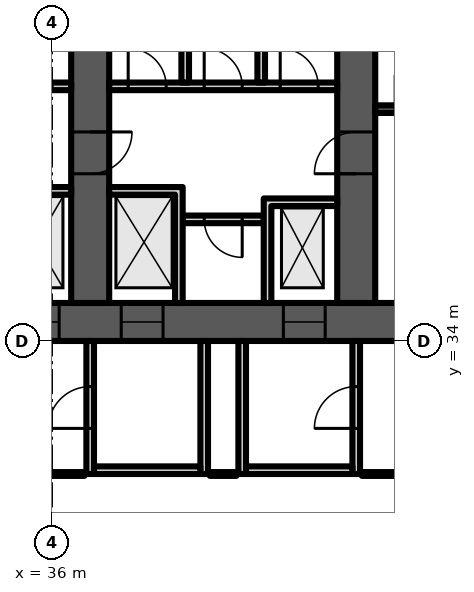
"""IFC4 building model, lengths in metres.
Left out: names, types, materials, properties, quantities, classifications, styles, units other than length and angle.
Written with IfcOpenShell. Run it as: python <this file> out.ifc"""

import sys

from ifc_helpers import new_model, si_unit, direction, frame, frame_2d, origin, place, context, subcontext, project, spatial, polyline, rectangle, outline, extrude, element, fill, save


model = new_model("IFC4")
c1 = context("Model", 3, precision=1e-05, world=origin(), true_north=direction((0.0, 1.0)))
c2 = subcontext(c1, "Body", "Model", "MODEL_VIEW")
j1 = project(units=[si_unit("LENGTHUNIT", "METRE"), si_unit("PLANEANGLEUNIT", "RADIAN")], contexts=[c1])
p1 = place(None, origin())
s1 = spatial("IfcSite", under=j1, at=p1, CompositionType="ELEMENT")
p2 = place(p1, origin())
s2 = spatial("IfcBuilding", under=s1, at=p2, CompositionType="ELEMENT")
p3 = place(p2, frame((0.0, 0.0, 96.7)))
s3 = spatial("IfcBuildingStorey", under=s2, at=p3, CompositionType="ELEMENT", Elevation=96.7)
p4 = place(p3, frame((16.0, 34.5, 0.0), z_axis=(0.0, 0.0, 1.0), x_axis=(1.0, 0.0, 0.0)))
e1 = element("IfcWall", 1, at=p4, inside=s3, PredefinedType="SHEAR", context=c2, shape_type="SweptSolid", body=[
    extrude(rectangle(XDim=49.0, YDim=1.0, at=frame_2d((24.5, 0.0))), origin(), (0.0, 0.0, 1.0), 3.6),
])
p5 = place(p4, frame((1.2, 0.0, 0.0)))
e2 = element("IfcOpeningElement", 2, at=p5, cuts=e1, PredefinedType="OPENING", context=c2, shape_type="SweptSolid", body=[
    extrude(rectangle(XDim=1.1, YDim=2.1, at=frame_2d((0.55, 1.05))), frame((0.0, 0.51, 0.0), z_axis=(0.0, -1.0, 0.0), x_axis=(1.0, 0.0, 0.0)), (0.0, 0.0, 1.0), 1.02),
])
p6 = place(p4, frame((5.083, 0.0, 0.0)))
e3 = element("IfcOpeningElement", 3, at=p6, cuts=e1, PredefinedType="OPENING", context=c2, shape_type="SweptSolid", body=[
    extrude(rectangle(XDim=1.1, YDim=2.1, at=frame_2d((0.55, 1.05))), frame((0.0, 0.51, 0.0), z_axis=(0.0, -1.0, 0.0), x_axis=(1.0, 0.0, 0.0)), (0.0, 0.0, 1.0), 1.02),
])
p7 = place(p4, frame((2.933, 0.0, 0.0)))
e4 = element("IfcOpeningElement", 4, at=p7, cuts=e1, PredefinedType="OPENING", context=c2, shape_type="SweptSolid", body=[
    extrude(rectangle(XDim=1.4, YDim=2.1, at=frame_2d((0.7, 1.05))), frame((0.0, 0.51, 0.0), z_axis=(0.0, -1.0, 0.0), x_axis=(1.0, 0.0, 0.0)), (0.0, 0.0, 1.0), 1.02),
])
p8 = place(p4, frame((7.65, 0.0, 0.0)))
e5 = element("IfcOpeningElement", 5, at=p8, cuts=e1, PredefinedType="OPENING", context=c2, shape_type="SweptSolid", body=[
    extrude(rectangle(XDim=1.2, YDim=2.1, at=frame_2d((0.6, 1.05))), frame((0.0, 0.51, 0.0), z_axis=(0.0, -1.0, 0.0), x_axis=(1.0, 0.0, 0.0)), (0.0, 0.0, 1.0), 1.02),
])
p9 = place(p4, frame((14.817, 0.0, 0.0)))
e6 = element("IfcOpeningElement", 6, at=p9, cuts=e1, PredefinedType="OPENING", context=c2, shape_type="SweptSolid", body=[
    extrude(rectangle(XDim=1.1, YDim=2.1, at=frame_2d((0.55, 1.05))), frame((0.0, 0.51, 0.0), z_axis=(0.0, -1.0, 0.0), x_axis=(1.0, 0.0, 0.0)), (0.0, 0.0, 1.0), 1.02),
])
p10 = place(p4, frame((19.083, 0.0, 0.0)))
e7 = element("IfcOpeningElement", 7, at=p10, cuts=e1, PredefinedType="OPENING", context=c2, shape_type="SweptSolid", body=[
    extrude(rectangle(XDim=1.1, YDim=2.1, at=frame_2d((0.55, 1.05))), frame((0.0, 0.51, 0.0), z_axis=(0.0, -1.0, 0.0), x_axis=(1.0, 0.0, 0.0)), (0.0, 0.0, 1.0), 1.02),
])
p11 = place(p4, frame((16.8, 0.0, 0.0)))
e8 = element("IfcOpeningElement", 8, at=p11, cuts=e1, PredefinedType="OPENING", context=c2, shape_type="SweptSolid", body=[
    extrude(rectangle(XDim=1.4, YDim=2.1, at=frame_2d((0.7, 1.05))), frame((0.0, 0.51, 0.0), z_axis=(0.0, -1.0, 0.0), x_axis=(1.0, 0.0, 0.0)), (0.0, 0.0, 1.0), 1.02),
])
p12 = place(p4, frame((21.817, 0.0, 0.0)))
e9 = element("IfcOpeningElement", 9, at=p12, cuts=e1, PredefinedType="OPENING", context=c2, shape_type="SweptSolid", body=[
    extrude(rectangle(XDim=1.1, YDim=2.1, at=frame_2d((0.55, 1.05))), frame((0.0, 0.51, 0.0), z_axis=(0.0, -1.0, 0.0), x_axis=(1.0, 0.0, 0.0)), (0.0, 0.0, 1.0), 1.02),
])
p13 = place(p4, frame((26.083, 0.0, 0.0)))
e10 = element("IfcOpeningElement", 10, at=p13, cuts=e1, PredefinedType="OPENING", context=c2, shape_type="SweptSolid", body=[
    extrude(rectangle(XDim=1.1, YDim=2.1, at=frame_2d((0.55, 1.05))), frame((0.0, 0.51, 0.0), z_axis=(0.0, -1.0, 0.0), x_axis=(1.0, 0.0, 0.0)), (0.0, 0.0, 1.0), 1.02),
])
p14 = place(p4, frame((33.15, 0.0, 0.0)))
e11 = element("IfcOpeningElement", 11, at=p14, cuts=e1, PredefinedType="OPENING", context=c2, shape_type="SweptSolid", body=[
    extrude(rectangle(XDim=1.2, YDim=2.1, at=frame_2d((0.6, 1.05))), frame((0.0, 0.51, 0.0), z_axis=(0.0, -1.0, 0.0), x_axis=(1.0, 0.0, 0.0)), (0.0, 0.0, 1.0), 1.02),
])
p15 = place(p4, frame((37.8, 0.0, 0.0)))
e12 = element("IfcOpeningElement", 12, at=p15, cuts=e1, PredefinedType="OPENING", context=c2, shape_type="SweptSolid", body=[
    extrude(rectangle(XDim=1.4, YDim=2.1, at=frame_2d((0.7, 1.05))), frame((0.0, 0.51, 0.0), z_axis=(0.0, -1.0, 0.0), x_axis=(1.0, 0.0, 0.0)), (0.0, 0.0, 1.0), 1.02),
])
p16 = place(p4, frame((42.817, 0.0, 0.0)))
e13 = element("IfcOpeningElement", 13, at=p16, cuts=e1, PredefinedType="OPENING", context=c2, shape_type="SweptSolid", body=[
    extrude(rectangle(XDim=1.1, YDim=2.1, at=frame_2d((0.55, 1.05))), frame((0.0, 0.51, 0.0), z_axis=(0.0, -1.0, 0.0), x_axis=(1.0, 0.0, 0.0)), (0.0, 0.0, 1.0), 1.02),
])
p17 = place(p4, frame((46.7, 0.0, 0.0)))
e14 = element("IfcOpeningElement", 14, at=p17, cuts=e1, PredefinedType="OPENING", context=c2, shape_type="SweptSolid", body=[
    extrude(rectangle(XDim=1.1, YDim=2.1, at=frame_2d((0.55, 1.05))), frame((0.0, 0.51, 0.0), z_axis=(0.0, -1.0, 0.0), x_axis=(1.0, 0.0, 0.0)), (0.0, 0.0, 1.0), 1.02),
])
p18 = place(p4, frame((44.667, 0.0, 0.0)))
e15 = element("IfcOpeningElement", 15, at=p18, cuts=e1, PredefinedType="OPENING", context=c2, shape_type="SweptSolid", body=[
    extrude(rectangle(XDim=1.4, YDim=2.1, at=frame_2d((0.7, 1.05))), frame((0.0, 0.51, 0.0), z_axis=(0.0, -1.0, 0.0), x_axis=(1.0, 0.0, 0.0)), (0.0, 0.0, 1.0), 1.02),
])
p19 = place(p3, frame((37.0, 35.0, 0.0), z_axis=(0.0, 0.0, 1.0), x_axis=(0.0, 1.0, 0.0)))
e16 = element("IfcWall", 16, at=p19, inside=s3, PredefinedType="SHEAR", context=c2, shape_type="SweptSolid", body=[
    extrude(rectangle(XDim=14.577, YDim=1.0, at=frame_2d((7.289, 0.0))), origin(), (0.0, 0.0, 1.0), 3.6),
])
p20 = place(p19, frame((3.4, 0.0, 0.0)))
e17 = element("IfcOpeningElement", 17, at=p20, cuts=e16, PredefinedType="OPENING", context=c2, shape_type="SweptSolid", body=[
    extrude(rectangle(XDim=1.1, YDim=2.1, at=frame_2d((0.55, 1.05))), frame((0.0, 0.51, 0.0), z_axis=(0.0, -1.0, 0.0), x_axis=(1.0, 0.0, 0.0)), (0.0, 0.0, 1.0), 1.02),
])
p21 = place(p19, frame((9.8, 0.0, 0.0)))
e18 = element("IfcOpeningElement", 18, at=p21, cuts=e16, PredefinedType="OPENING", context=c2, shape_type="SweptSolid", body=[
    extrude(rectangle(XDim=1.0, YDim=2.1, at=frame_2d((0.5, 1.05))), frame((0.0, 0.51, 0.0), z_axis=(0.0, -1.0, 0.0), x_axis=(1.0, 0.0, 0.0)), (0.0, 0.0, 1.0), 1.02),
])
p22 = place(p3, frame((44.0, 35.0, 0.0), z_axis=(0.0, 0.0, 1.0), x_axis=(0.0, 1.0, 0.0)))
e19 = element("IfcWall", 19, at=p22, inside=s3, PredefinedType="SHEAR", context=c2, shape_type="SweptSolid", body=[
    extrude(rectangle(XDim=14.577, YDim=1.0, at=frame_2d((7.289, 0.0))), origin(), (0.0, 0.0, 1.0), 3.6),
])
p23 = place(p22, frame((3.4, 0.0, 0.0)))
e20 = element("IfcOpeningElement", 20, at=p23, cuts=e19, PredefinedType="OPENING", context=c2, shape_type="SweptSolid", body=[
    extrude(rectangle(XDim=1.1, YDim=2.1, at=frame_2d((0.55, 1.05))), frame((0.0, 0.51, 0.0), z_axis=(0.0, -1.0, 0.0), x_axis=(1.0, 0.0, 0.0)), (0.0, 0.0, 1.0), 1.02),
])
p24 = place(p22, frame((9.8, 0.0, 0.0)))
e21 = element("IfcOpeningElement", 21, at=p24, cuts=e19, PredefinedType="OPENING", context=c2, shape_type="SweptSolid", body=[
    extrude(rectangle(XDim=1.0, YDim=2.1, at=frame_2d((0.5, 1.05))), frame((0.0, 0.51, 0.0), z_axis=(0.0, -1.0, 0.0), x_axis=(1.0, 0.0, 0.0)), (0.0, 0.0, 1.0), 1.02),
])
p25 = place(p3, frame((30.5, 40.7, 0.0), z_axis=(0.0, 0.0, 1.0), x_axis=(1.0, 0.0, 0.0)))
e22 = element("IfcWall", 22, at=p25, inside=s3, PredefinedType="PARTITIONING", context=c2, shape_type="SweptSolid", body=[
    extrude(rectangle(XDim=6.0, YDim=0.2, at=frame_2d((3.0, 0.0))), origin(), (0.0, 0.0, 1.0), 3.2),
])
p26 = place(p25, frame((0.5, 0.0, 0.0)))
e23 = element("IfcOpeningElement", 23, at=p26, cuts=e22, PredefinedType="OPENING", context=c2, shape_type="SweptSolid", body=[
    extrude(rectangle(XDim=1.0, YDim=2.1, at=frame_2d((0.5, 1.05))), frame((0.0, 0.11, 0.0), z_axis=(0.0, -1.0, 0.0), x_axis=(1.0, 0.0, 0.0)), (0.0, 0.0, 1.0), 0.22),
])
p27 = place(p25, frame((2.5, 0.0, 0.0)))
e24 = element("IfcOpeningElement", 24, at=p27, cuts=e22, PredefinedType="OPENING", context=c2, shape_type="SweptSolid", body=[
    extrude(rectangle(XDim=1.0, YDim=2.1, at=frame_2d((0.5, 1.05))), frame((0.0, 0.11, 0.0), z_axis=(0.0, -1.0, 0.0), x_axis=(1.0, 0.0, 0.0)), (0.0, 0.0, 1.0), 0.22),
])
p28 = place(p25, frame((4.5, 0.0, 0.0)))
e25 = element("IfcOpeningElement", 25, at=p28, cuts=e22, PredefinedType="OPENING", context=c2, shape_type="SweptSolid", body=[
    extrude(rectangle(XDim=1.0, YDim=2.1, at=frame_2d((0.5, 1.05))), frame((0.0, 0.11, 0.0), z_axis=(0.0, -1.0, 0.0), x_axis=(1.0, 0.0, 0.0)), (0.0, 0.0, 1.0), 0.22),
])
p29 = place(p3, frame((0.0, 0.0, -0.0)))
e26 = element("IfcWall", 26, at=p29, inside=s3, PredefinedType="PARTITIONING", context=c2, shape_type="SweptSolid", body=[
    extrude(outline(polyline([(34.567, 38.05), (34.767, 38.05), (36.5, 38.05), (36.5, 37.85), (34.767, 37.85), (34.767, 35.0), (34.567, 35.0), (34.567, 38.05)])), origin(), (0.0, 0.0, 1.0), 3.2),
])
p30 = place(p3, frame((39.433, 37.2, 0.0), z_axis=(0.0, 0.0, 1.0), x_axis=(1.0, 0.0, 0.0)))
e27 = element("IfcWall", 27, at=p30, inside=s3, PredefinedType="PARTITIONING", context=c2, shape_type="SweptSolid", body=[
    extrude(rectangle(XDim=2.133, YDim=0.2, at=frame_2d((1.067, 0.0))), origin(), (0.0, 0.0, 1.0), 3.2),
])
p31 = place(p30, frame((0.567, 0.0, 0.0)))
e28 = element("IfcOpeningElement", 28, at=p31, cuts=e27, PredefinedType="OPENING", context=c2, shape_type="SweptSolid", body=[
    extrude(rectangle(XDim=1.0, YDim=2.1, at=frame_2d((0.5, 1.05))), frame((0.0, 0.11, 0.0), z_axis=(0.0, -1.0, 0.0), x_axis=(1.0, 0.0, 0.0)), (0.0, 0.0, 1.0), 0.22),
])
p32 = place(p3, frame((37.5, 40.7, 0.0), z_axis=(0.0, 0.0, 1.0), x_axis=(1.0, 0.0, 0.0)))
e29 = element("IfcWall", 29, at=p32, inside=s3, PredefinedType="PARTITIONING", context=c2, shape_type="SweptSolid", body=[
    extrude(rectangle(XDim=6.0, YDim=0.2, at=frame_2d((3.0, 0.0))), origin(), (0.0, 0.0, 1.0), 3.2),
])
p33 = place(p32, frame((0.5, 0.0, 0.0)))
e30 = element("IfcOpeningElement", 30, at=p33, cuts=e29, PredefinedType="OPENING", context=c2, shape_type="SweptSolid", body=[
    extrude(rectangle(XDim=1.0, YDim=2.1, at=frame_2d((0.5, 1.05))), frame((0.0, 0.11, 0.0), z_axis=(0.0, -1.0, 0.0), x_axis=(1.0, 0.0, 0.0)), (0.0, 0.0, 1.0), 0.22),
])
p34 = place(p32, frame((2.5, 0.0, 0.0)))
e31 = element("IfcOpeningElement", 31, at=p34, cuts=e29, PredefinedType="OPENING", context=c2, shape_type="SweptSolid", body=[
    extrude(rectangle(XDim=1.0, YDim=2.1, at=frame_2d((0.5, 1.05))), frame((0.0, 0.11, 0.0), z_axis=(0.0, -1.0, 0.0), x_axis=(1.0, 0.0, 0.0)), (0.0, 0.0, 1.0), 0.22),
])
p35 = place(p32, frame((4.5, 0.0, 0.0)))
e32 = element("IfcOpeningElement", 32, at=p35, cuts=e29, PredefinedType="OPENING", context=c2, shape_type="SweptSolid", body=[
    extrude(rectangle(XDim=1.0, YDim=2.1, at=frame_2d((0.5, 1.05))), frame((0.0, 0.11, 0.0), z_axis=(0.0, -1.0, 0.0), x_axis=(1.0, 0.0, 0.0)), (0.0, 0.0, 1.0), 0.22),
])
p36 = place(p3, frame((0.0, 0.0, -0.0)))
e33 = element("IfcWall", 33, at=p36, inside=s3, PredefinedType="PARTITIONING", context=c2, shape_type="SweptSolid", body=[
    extrude(outline(polyline([(41.567, 37.75), (41.767, 37.75), (43.5, 37.75), (43.5, 37.55), (41.767, 37.55), (41.767, 35.0), (41.567, 35.0), (41.567, 37.75)])), origin(), (0.0, 0.0, 1.0), 3.2),
])
p37 = place(p3, frame((0.0, 0.0, -0.0)))
e34 = element("IfcWall", 34, at=p37, inside=s3, PredefinedType="PARTITIONING", context=c2, shape_type="SweptSolid", body=[
    extrude(outline(polyline([(39.233, 37.85), (37.5, 37.85), (37.5, 38.05), (39.233, 38.05), (39.433, 38.05), (39.433, 35.0), (39.233, 35.0), (39.233, 37.85)])), origin(), (0.0, 0.0, 1.0), 3.2),
])
for number, where, z_axis, x_axis in (
    (35, (39.5, 40.8, 0.0), (0.0, 0.0, 1.0), (0.0, 1.0, 0.0)),
    (36, (41.5, 40.8, 0.0), (0.0, 0.0, 1.0), (0.0, 1.0, 0.0)),
):
    element("IfcWall", number, at=place(p3, frame(where, z_axis=z_axis, x_axis=x_axis)), inside=s3, PredefinedType="PARTITIONING", context=c2, shape_type="SweptSolid", body=[
        extrude(rectangle(XDim=8.844, YDim=0.2, at=frame_2d((4.422, 0.0))), origin(), (0.0, 0.0, 1.0), 3.2),
    ])
p38 = place(p3, frame((44.5, 40.1, 0.0), z_axis=(0.0, 0.0, 1.0), x_axis=(1.0, 0.0, 0.0)))
e37 = element("IfcWall", 37, at=p38, inside=s3, PredefinedType="SHEAR", context=c2, shape_type="SweptSolid", body=[
    extrude(rectangle(XDim=6.0, YDim=0.2, at=frame_2d((3.0, 0.0))), origin(), (0.0, 0.0, 1.0), 3.2),
])
p39 = place(p38, frame((3.425, 0.0, 0.0)))
e38 = element("IfcOpeningElement", 38, at=p39, cuts=e37, PredefinedType="OPENING", context=c2, shape_type="SweptSolid", body=[
    extrude(rectangle(XDim=1.2, YDim=2.1, at=frame_2d((0.6, 1.05))), frame((0.0, 0.11, 0.0), z_axis=(0.0, -1.0, 0.0), x_axis=(1.0, 0.0, 0.0)), (0.0, 0.0, 1.0), 0.22),
])
p40 = place(p38, frame((0.525, 0.0, 0.0)))
e39 = element("IfcOpeningElement", 39, at=p40, cuts=e37, PredefinedType="OPENING", context=c2, shape_type="SweptSolid", body=[
    extrude(rectangle(XDim=0.9, YDim=2.1, at=frame_2d((0.45, 1.05))), frame((0.0, 0.11, 0.0), z_axis=(0.0, -1.0, 0.0), x_axis=(1.0, 0.0, 0.0)), (0.0, 0.0, 1.0), 0.22),
])
p41 = place(p3, frame((37.0, 30.5, 0.0), z_axis=(0.0, 0.0, 1.0), x_axis=(0.0, 1.0, 0.0)))
e40 = element("IfcWall", 40, at=p41, inside=s3, PredefinedType="PARTITIONING", context=c2, shape_type="SweptSolid", body=[
    extrude(rectangle(XDim=3.5, YDim=0.2, at=frame_2d((1.75, 0.0))), origin(), (0.0, 0.0, 1.0), 3.2),
])
p42 = place(p41, frame((1.2, 0.0, 0.0)))
e41 = element("IfcOpeningElement", 41, at=p42, cuts=e40, PredefinedType="OPENING", context=c2, shape_type="SweptSolid", body=[
    extrude(rectangle(XDim=1.1, YDim=2.1, at=frame_2d((0.55, 1.05))), frame((0.0, 0.11, 0.0), z_axis=(0.0, -1.0, 0.0), x_axis=(1.0, 0.0, 0.0)), (0.0, 0.0, 1.0), 0.22),
])
p43 = place(p3, frame((40.0, 30.5, 0.0), z_axis=(0.0, 0.0, 1.0), x_axis=(0.0, 1.0, 0.0)))
e42 = element("IfcWall", 42, at=p43, inside=s3, PredefinedType="PARTITIONING", context=c2, shape_type="SweptSolid", body=[
    extrude(rectangle(XDim=3.5, YDim=0.2, at=frame_2d((1.75, 0.0))), origin(), (0.0, 0.0, 1.0), 3.2),
])
p44 = place(p3, frame((37.1, 30.6, 0.0), z_axis=(0.0, 0.0, 1.0), x_axis=(1.0, 0.0, 0.0)))
e43 = element("IfcWall", 43, at=p44, inside=s3, PredefinedType="PARTITIONING", context=c2, shape_type="SweptSolid", body=[
    extrude(rectangle(XDim=2.8, YDim=0.2, at=frame_2d((1.4, 0.0))), origin(), (0.0, 0.0, 1.0), 3.2),
])
p45 = place(p3, frame((41.0, 30.5, 0.0), z_axis=(0.0, 0.0, 1.0), x_axis=(0.0, 1.0, 0.0)))
e44 = element("IfcWall", 44, at=p45, inside=s3, PredefinedType="PARTITIONING", context=c2, shape_type="SweptSolid", body=[
    extrude(rectangle(XDim=3.5, YDim=0.2, at=frame_2d((1.75, 0.0))), origin(), (0.0, 0.0, 1.0), 3.2),
])
p46 = place(p3, frame((44.0, 30.5, 0.0), z_axis=(0.0, 0.0, 1.0), x_axis=(0.0, 1.0, 0.0)))
e45 = element("IfcWall", 45, at=p46, inside=s3, PredefinedType="PARTITIONING", context=c2, shape_type="SweptSolid", body=[
    extrude(rectangle(XDim=3.5, YDim=0.2, at=frame_2d((1.75, 0.0))), origin(), (0.0, 0.0, 1.0), 3.2),
])
p47 = place(p46, frame((1.2, 0.0, 0.0)))
e46 = element("IfcOpeningElement", 46, at=p47, cuts=e45, PredefinedType="OPENING", context=c2, shape_type="SweptSolid", body=[
    extrude(rectangle(XDim=1.1, YDim=2.1, at=frame_2d((0.55, 1.05))), frame((0.0, 0.11, 0.0), z_axis=(0.0, -1.0, 0.0), x_axis=(1.0, 0.0, 0.0)), (0.0, 0.0, 1.0), 0.22),
])
p48 = place(p3, frame((41.1, 30.6, 0.0), z_axis=(0.0, 0.0, 1.0), x_axis=(1.0, 0.0, 0.0)))
e47 = element("IfcWall", 47, at=p48, inside=s3, PredefinedType="PARTITIONING", context=c2, shape_type="SweptSolid", body=[
    extrude(rectangle(XDim=2.8, YDim=0.2, at=frame_2d((1.4, 0.0))), origin(), (0.0, 0.0, 1.0), 3.2),
])
p49 = place(p3, frame((18.455, 30.5, 0.0), z_axis=(0.0, 0.0, 1.0), x_axis=(1.0, 0.0, 0.0)))
e48 = element("IfcWall", 48, at=p49, inside=s3, PredefinedType="PARTITIONING", context=c2, shape_type="SweptSolid", body=[
    extrude(rectangle(XDim=18.395, YDim=0.1, at=frame_2d((9.198, 0.0))), origin(), (0.0, 0.0, 1.0), 3.2),
])
p50 = place(p49, frame((16.39, 0.0, 0.0)))
e49 = element("IfcOpeningElement", 49, at=p50, cuts=e48, PredefinedType="OPENING", context=c2, shape_type="SweptSolid", body=[
    extrude(rectangle(XDim=1.0, YDim=2.1, at=frame_2d((0.5, 1.05))), frame((0.0, 0.06, 0.0), z_axis=(0.0, -1.0, 0.0), x_axis=(1.0, 0.0, 0.0)), (0.0, 0.0, 1.0), 0.12),
])
p51 = place(p3, frame((40.15, 30.5, 0.0), z_axis=(0.0, 0.0, 1.0), x_axis=(1.0, 0.0, 0.0)))
e50 = element("IfcWall", 50, at=p51, inside=s3, PredefinedType="PARTITIONING", context=c2, shape_type="SweptSolid", body=[
    extrude(rectangle(XDim=0.7, YDim=0.1, at=frame_2d((0.35, 0.0))), origin(), (0.0, 0.0, 1.0), 3.2),
])
p52 = place(p3, frame((44.15, 30.5, 0.0), z_axis=(0.0, 0.0, 1.0), x_axis=(1.0, 0.0, 0.0)))
e51 = element("IfcWall", 51, at=p52, inside=s3, PredefinedType="PARTITIONING", context=c2, shape_type="SweptSolid", body=[
    extrude(rectangle(XDim=19.425, YDim=0.1, at=frame_2d((9.712, 0.0))), origin(), (0.0, 0.0, 1.0), 3.2),
])
p53 = place(p52, frame((6.245, 0.0, 0.0)))
e52 = element("IfcOpeningElement", 52, at=p53, cuts=e51, PredefinedType="OPENING", context=c2, shape_type="SweptSolid", body=[
    extrude(rectangle(XDim=1.0, YDim=2.1, at=frame_2d((0.5, 1.05))), frame((0.0, 0.06, 0.0), z_axis=(0.0, -1.0, 0.0), x_axis=(1.0, 0.0, 0.0)), (0.0, 0.0, 1.0), 0.12),
])
p54 = place(p10, origin())
e53 = element("IfcDoor", 53, at=p54, inside=s3, OperationType="DOUBLE_DOOR_SLIDING", PredefinedType="DOOR", context=c2, shape_type="SweptSolid", body=[
    extrude(rectangle(XDim=1.1, YDim=2.1, at=frame_2d((0.55, 1.05))), frame((0.0, 0.025, 0.0), z_axis=(0.0, -1.0, 0.0), x_axis=(1.0, 0.0, 0.0)), (0.0, 0.0, 1.0), 0.05),
])
fill(e7, e53)
p55 = place(p31, origin())
e54 = element("IfcDoor", 54, at=p55, inside=s3, OperationType="SINGLE_SWING_RIGHT", PredefinedType="DOOR", context=c2, shape_type="SweptSolid", body=[
    extrude(rectangle(XDim=1.0, YDim=2.1, at=frame_2d((0.5, 1.05))), frame((0.0, 0.025, 0.0), z_axis=(0.0, -1.0, 0.0), x_axis=(1.0, 0.0, 0.0)), (0.0, 0.0, 1.0), 0.05),
])
fill(e28, e54)
p56 = place(p12, origin())
e55 = element("IfcDoor", 55, at=p56, inside=s3, OperationType="DOUBLE_DOOR_SLIDING", PredefinedType="DOOR", context=c2, shape_type="SweptSolid", body=[
    extrude(rectangle(XDim=1.1, YDim=2.1, at=frame_2d((0.55, 1.05))), frame((0.0, 0.025, 0.0), z_axis=(0.0, -1.0, 0.0), x_axis=(1.0, 0.0, 0.0)), (0.0, 0.0, 1.0), 0.05),
])
fill(e9, e55)
p57 = place(p13, origin())
e56 = element("IfcDoor", 56, at=p57, inside=s3, OperationType="DOUBLE_DOOR_SLIDING", PredefinedType="DOOR", context=c2, shape_type="SweptSolid", body=[
    extrude(rectangle(XDim=1.1, YDim=2.1, at=frame_2d((0.55, 1.05))), frame((0.0, 0.025, 0.0), z_axis=(0.0, -1.0, 0.0), x_axis=(1.0, 0.0, 0.0)), (0.0, 0.0, 1.0), 0.05),
])
fill(e10, e56)
p58 = place(p33, origin())
e57 = element("IfcDoor", 57, at=p58, inside=s3, OperationType="SINGLE_SWING_LEFT", PredefinedType="DOOR", context=c2, shape_type="SweptSolid", body=[
    extrude(rectangle(XDim=1.0, YDim=2.1, at=frame_2d((0.5, 1.05))), frame((0.0, 0.025, 0.0), z_axis=(0.0, -1.0, 0.0), x_axis=(1.0, 0.0, 0.0)), (0.0, 0.0, 1.0), 0.05),
])
fill(e30, e57)
p59 = place(p34, origin())
e58 = element("IfcDoor", 58, at=p59, inside=s3, OperationType="SINGLE_SWING_LEFT", PredefinedType="DOOR", context=c2, shape_type="SweptSolid", body=[
    extrude(rectangle(XDim=1.0, YDim=2.1, at=frame_2d((0.5, 1.05))), frame((0.0, 0.025, 0.0), z_axis=(0.0, -1.0, 0.0), x_axis=(1.0, 0.0, 0.0)), (0.0, 0.0, 1.0), 0.05),
])
fill(e31, e58)
p60 = place(p35, origin())
e59 = element("IfcDoor", 59, at=p60, inside=s3, OperationType="SINGLE_SWING_LEFT", PredefinedType="DOOR", context=c2, shape_type="SweptSolid", body=[
    extrude(rectangle(XDim=1.0, YDim=2.1, at=frame_2d((0.5, 1.05))), frame((0.0, 0.025, 0.0), z_axis=(0.0, -1.0, 0.0), x_axis=(1.0, 0.0, 0.0)), (0.0, 0.0, 1.0), 0.05),
])
fill(e32, e59)
p61 = place(p20, origin())
e60 = element("IfcDoor", 60, at=p61, inside=s3, OperationType="SINGLE_SWING_RIGHT", PredefinedType="DOOR", context=c2, shape_type="SweptSolid", body=[
    extrude(rectangle(XDim=1.1, YDim=2.1, at=frame_2d((0.55, 1.05))), frame((0.0, 0.025, 0.0), z_axis=(0.0, -1.0, 0.0), x_axis=(1.0, 0.0, 0.0)), (0.0, 0.0, 1.0), 0.05),
])
fill(e17, e60)
p62 = place(p23, origin())
e61 = element("IfcDoor", 61, at=p62, inside=s3, OperationType="SINGLE_SWING_LEFT", PredefinedType="DOOR", context=c2, shape_type="SweptSolid", body=[
    extrude(rectangle(XDim=1.1, YDim=2.1, at=frame_2d((0.55, 1.05))), frame((0.0, 0.025, 0.0), z_axis=(0.0, -1.0, 0.0), x_axis=(1.0, 0.0, 0.0)), (0.0, 0.0, 1.0), 0.05),
])
fill(e20, e61)
p63 = place(p42, origin())
e62 = element("IfcDoor", 62, at=p63, inside=s3, OperationType="SINGLE_SWING_LEFT", PredefinedType="DOOR", context=c2, shape_type="SweptSolid", body=[
    extrude(rectangle(XDim=1.1, YDim=2.1, at=frame_2d((0.55, 1.05))), frame((0.0, 0.025, 0.0), z_axis=(0.0, -1.0, 0.0), x_axis=(1.0, 0.0, 0.0)), (0.0, 0.0, 1.0), 0.05),
])
fill(e41, e62)
p64 = place(p47, origin())
e63 = element("IfcDoor", 63, at=p64, inside=s3, OperationType="SINGLE_SWING_LEFT", PredefinedType="DOOR", context=c2, shape_type="SweptSolid", body=[
    extrude(rectangle(XDim=1.1, YDim=2.1, at=frame_2d((0.55, 1.05))), frame((0.0, 0.025, 0.0), z_axis=(0.0, -1.0, 0.0), x_axis=(1.0, 0.0, 0.0)), (0.0, 0.0, 1.0), 0.05),
])
fill(e46, e63)
save(model, sys.argv[1])
